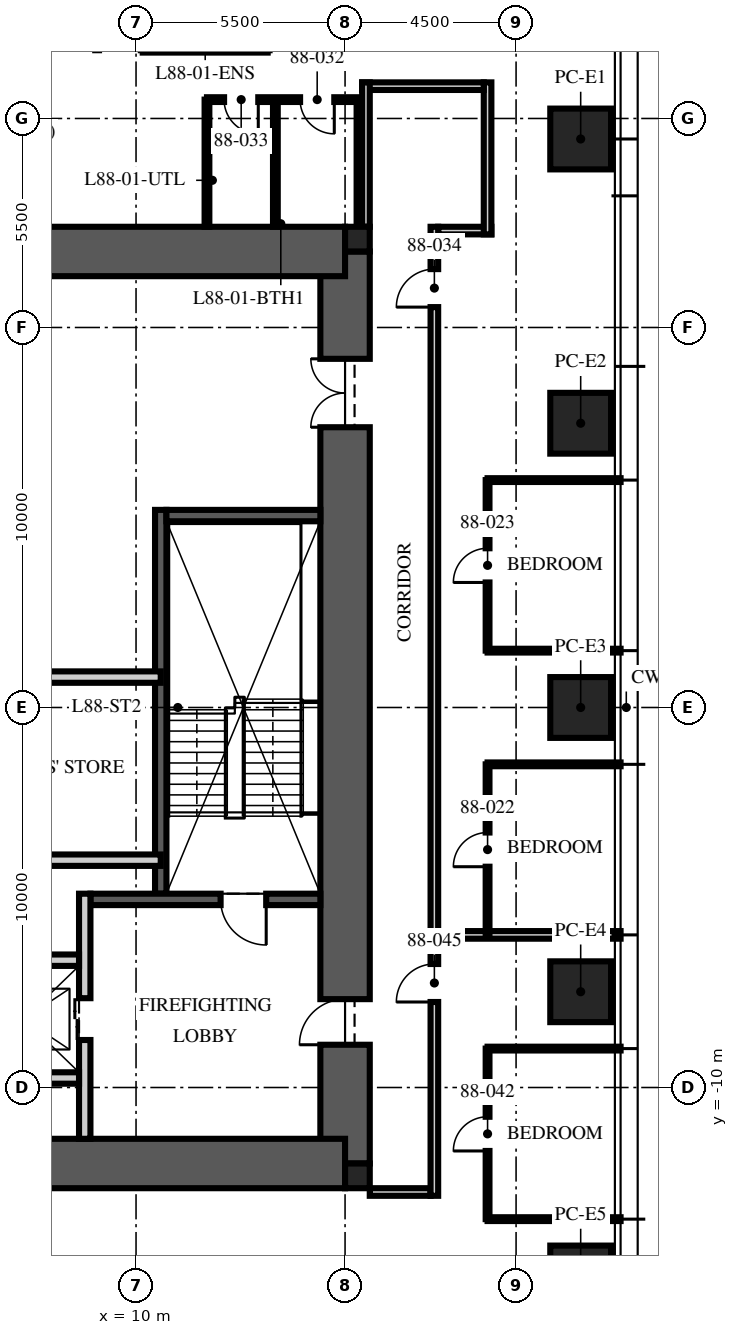
"""IFC4 building model, lengths in metres.
Left out: names, types, materials, properties, quantities, classifications, styles, units other than length and angle.
Written with IfcOpenShell. Run it as: python <this file> out.ifc"""

import sys

from ifc_helpers import new_model, si_unit, direction, frame, frame_2d, origin, origin_2d, place, context, subcontext, project, spatial, rectangle, extrude, element, fill, save


model = new_model("IFC4")
c1 = context("Model", 3, precision=1e-05, world=origin(), true_north=direction((0.0, 1.0)))
c2 = subcontext(c1, "Body", "Model", "MODEL_VIEW")
j1 = project(units=[si_unit("LENGTHUNIT", "METRE"), si_unit("PLANEANGLEUNIT", "RADIAN")], contexts=[c1])
p1 = place(None, origin())
s1 = spatial("IfcSite", under=j1, at=p1, CompositionType="ELEMENT")
p2 = place(p1, origin())
s2 = spatial("IfcBuilding", under=s1, at=p2, CompositionType="ELEMENT")
p3 = place(p2, frame((0.0, 0.0, 349.5)))
s3 = spatial("IfcBuildingStorey", under=s2, at=p3, CompositionType="ELEMENT", Elevation=349.5)
p4 = place(p3, frame((15.5, -12.0, -0.25), z_axis=(0.0, 0.0, 1.0), x_axis=(0.0, 1.0, 0.0)))
e1 = element("IfcWall", 1, at=p4, inside=s3, PredefinedType="SHEAR", context=c2, shape_type="SweptSolid", body=[
    extrude(rectangle(XDim=24.0, YDim=1.3, at=frame_2d((12.0, 0.0))), origin(), (0.0, 0.0, 1.0), 3.7),
])
p5 = place(p4, frame((3.125, 0.0, 0.25)))
e2 = element("IfcOpeningElement", 2, at=p5, cuts=e1, PredefinedType="OPENING", context=c2, shape_type="SweptSolid", body=[
    extrude(rectangle(XDim=1.2, YDim=2.1, at=frame_2d((0.6, 1.05))), frame((0.0, 0.66, 0.0), z_axis=(0.0, -1.0, 0.0), x_axis=(1.0, 0.0, 0.0)), (0.0, 0.0, 1.0), 1.32),
])
p6 = place(p4, frame((19.375, 0.0, 0.25)))
e3 = element("IfcOpeningElement", 3, at=p6, cuts=e1, PredefinedType="OPENING", context=c2, shape_type="SweptSolid", body=[
    extrude(rectangle(XDim=1.8, YDim=2.1, at=frame_2d((0.9, 1.05))), frame((0.0, 0.66, 0.0), z_axis=(0.0, -1.0, 0.0), x_axis=(1.0, 0.0, 0.0)), (0.0, 0.0, 1.0), 1.32),
])
for number, where, z_axis, x_axis in (
    (4, (-15.5, 12.0, -0.25), (0.0, 0.0, 1.0), (1.0, 0.0, 0.0)),
    (5, (-15.5, -12.0, -0.25), (0.0, 0.0, 1.0), (1.0, 0.0, 0.0)),
):
    element("IfcWall", number, at=place(p3, frame(where, z_axis=z_axis, x_axis=x_axis)), inside=s3, PredefinedType="SHEAR", context=c2, shape_type="SweptSolid", body=[
        extrude(rectangle(XDim=31.0, YDim=1.3, at=frame_2d((15.5, 0.0))), origin(), (0.0, 0.0, 1.0), 3.7),
    ])
for number, where, z_axis, x_axis in (
    (6, (15.825, 12.325, -0.25), (0.0, 0.0, 1.0), (1.0, 0.0, 0.0)),
    (7, (15.825, -12.325, -0.25), (0.0, 0.0, 1.0), (1.0, 0.0, 0.0)),
):
    element("IfcColumn", number, at=place(p3, frame(where, z_axis=z_axis, x_axis=x_axis)), inside=s3, PredefinedType="COLUMN", context=c2, shape_type="SweptSolid", body=[
        extrude(rectangle(XDim=0.65, YDim=0.65, at=origin_2d()), origin(), (0.0, 0.0, 1.0), 3.7),
    ])
for number, where, z_axis, x_axis in (
    (8, (21.7, 14.96, 0.0), (0.0, 0.0, 1.0), (0.0, 1.0, 0.0)),
    (9, (21.7, 7.48, 0.0), (0.0, 0.0, 1.0), (0.0, 1.0, 0.0)),
    (10, (21.7, 0.0, 0.0), (0.0, 0.0, 1.0), (0.0, 1.0, 0.0)),
    (11, (21.7, -7.48, 0.0), (0.0, 0.0, 1.0), (0.0, 1.0, 0.0)),
    (12, (21.7, -14.96, 0.0), (0.0, 0.0, 1.0), (0.0, 1.0, 0.0)),
):
    element("IfcColumn", number, at=place(p3, frame(where, z_axis=z_axis, x_axis=x_axis)), inside=s3, PredefinedType="COLUMN", context=c2, shape_type="SweptSolid", body=[
        extrude(rectangle(XDim=1.6, YDim=1.6, at=origin_2d()), origin(), (0.0, 0.0, 1.0), 3.75),
    ])
p7 = place(p3, frame((10.65, -4.9, 0.0), z_axis=(0.0, 0.0, 1.0), x_axis=(0.0, 1.0, 0.0)))
e13 = element("IfcWall", 13, at=p7, inside=s3, PredefinedType="SOLIDWALL", context=c2, shape_type="SweptSolid", body=[
    extrude(rectangle(XDim=10.1, YDim=0.3, at=frame_2d((5.05, 0.0))), origin(), (0.0, 0.0, 1.0), 3.45),
])
p8 = place(p3, frame((14.85, -5.05, 0.0), z_axis=(0.0, 0.0, 1.0), x_axis=(-1.0, 0.0, 0.0)))
e14 = element("IfcWall", 14, at=p8, inside=s3, PredefinedType="SOLIDWALL", context=c2, shape_type="SweptSolid", body=[
    extrude(rectangle(XDim=6.05, YDim=0.3, at=frame_2d((3.025, 0.0))), origin(), (0.0, 0.0, 1.0), 3.45),
])
p9 = place(p8, frame((1.425, 0.0, 0.0)))
e15 = element("IfcOpeningElement", 15, at=p9, cuts=e14, PredefinedType="OPENING", context=c2, shape_type="SweptSolid", body=[
    extrude(rectangle(XDim=1.2, YDim=2.1, at=frame_2d((0.6, 1.05))), frame((0.0, 0.16, 0.0), z_axis=(0.0, -1.0, 0.0), x_axis=(1.0, 0.0, 0.0)), (0.0, 0.0, 1.0), 0.32),
])
p10 = place(p3, frame((14.85, 5.05, 0.0), z_axis=(0.0, 0.0, 1.0), x_axis=(-1.0, 0.0, 0.0)))
e16 = element("IfcWall", 16, at=p10, inside=s3, PredefinedType="SOLIDWALL", context=c2, shape_type="SweptSolid", body=[
    extrude(rectangle(XDim=4.05, YDim=0.3, at=frame_2d((2.025, 0.0))), origin(), (0.0, 0.0, 1.0), 3.45),
])
p11 = place(p3, frame((8.65, -11.35, 0.0), z_axis=(0.0, 0.0, 1.0), x_axis=(0.0, 1.0, 0.0)))
e17 = element("IfcWall", 17, at=p11, inside=s3, PredefinedType="PARTITIONING", context=c2, shape_type="SweptSolid", body=[
    extrude(rectangle(XDim=6.45, YDim=0.3, at=frame_2d((3.225, 0.0))), origin(), (0.0, 0.0, 1.0), 3.45),
])
p12 = place(p11, frame((2.6, 0.0, 0.0)))
e18 = element("IfcOpeningElement", 18, at=p12, cuts=e17, PredefinedType="OPENING", context=c2, shape_type="SweptSolid", body=[
    extrude(rectangle(XDim=1.1, YDim=2.1, at=frame_2d((0.55, 1.05))), frame((0.0, 0.16, 0.0), z_axis=(0.0, -1.0, 0.0), x_axis=(1.0, 0.0, 0.0)), (0.0, 0.0, 1.0), 0.32),
])
p13 = place(p3, frame((-8.5, -6.65, 0.0), z_axis=(0.0, 0.0, 1.0), x_axis=(1.0, 0.0, 0.0)))
e19 = element("IfcWall", 19, at=p13, inside=s3, PredefinedType="PARTITIONING", context=c2, shape_type="SweptSolid", body=[
    extrude(rectangle(XDim=17.0, YDim=0.3, at=frame_2d((8.5, 0.0))), origin(), (0.0, 0.0, 1.0), 3.45),
])
p14 = place(p13, frame((7.8, 0.0, 0.0)))
e20 = element("IfcOpeningElement", 20, at=p14, cuts=e19, PredefinedType="OPENING", context=c2, shape_type="SweptSolid", body=[
    extrude(rectangle(XDim=1.3, YDim=2.4, at=frame_2d((0.65, 1.2))), frame((0.0, 0.16, 0.0), z_axis=(0.0, -1.0, 0.0), x_axis=(1.0, 0.0, 0.0)), (0.0, 0.0, 1.0), 0.32),
])
p15 = place(p13, frame((5.65, 0.0, 0.0)))
e21 = element("IfcOpeningElement", 21, at=p15, cuts=e19, PredefinedType="OPENING", context=c2, shape_type="SweptSolid", body=[
    extrude(rectangle(XDim=0.9, YDim=2.1, at=frame_2d((0.45, 1.05))), frame((0.0, 0.16, 0.0), z_axis=(0.0, -1.0, 0.0), x_axis=(1.0, 0.0, 0.0)), (0.0, 0.0, 1.0), 0.32),
])
p16 = place(p13, frame((10.4, 0.0, 0.0)))
e22 = element("IfcOpeningElement", 22, at=p16, cuts=e19, PredefinedType="OPENING", context=c2, shape_type="SweptSolid", body=[
    extrude(rectangle(XDim=0.9, YDim=2.1, at=frame_2d((0.45, 1.05))), frame((0.0, 0.16, 0.0), z_axis=(0.0, -1.0, 0.0), x_axis=(1.0, 0.0, 0.0)), (0.0, 0.0, 1.0), 0.32),
])
p17 = place(p3, frame((5.6, -9.75, 0.0), z_axis=(0.0, 0.0, 1.0), x_axis=(1.0, 0.0, 0.0)))
e23 = element("IfcWall", 23, at=p17, inside=s3, PredefinedType="PARTITIONING", context=c2, shape_type="SweptSolid", body=[
    extrude(rectangle(XDim=2.9, YDim=0.3, at=frame_2d((1.45, 0.0))), origin(), (0.0, 0.0, 1.0), 3.45),
])
p18 = place(p3, frame((-10.65, 0.8, 0.0), z_axis=(0.0, 0.0, 1.0), x_axis=(1.0, 0.0, 0.0)))
e24 = element("IfcWall", 24, at=p18, inside=s3, PredefinedType="PARTITIONING", context=c2, shape_type="SweptSolid", body=[
    extrude(rectangle(XDim=21.3, YDim=0.3, at=frame_2d((10.65, 0.0))), origin(), (0.0, 0.0, 1.0), 3.45),
])
p19 = place(p18, frame((10.05, 0.0, 0.0)))
e25 = element("IfcOpeningElement", 25, at=p19, cuts=e24, PredefinedType="OPENING", context=c2, shape_type="SweptSolid", body=[
    extrude(rectangle(XDim=1.2, YDim=2.1, at=frame_2d((0.6, 1.05))), frame((0.0, 0.16, 0.0), z_axis=(0.0, -1.0, 0.0), x_axis=(1.0, 0.0, 0.0)), (0.0, 0.0, 1.0), 0.32),
])
p20 = place(p18, frame((0.793, 0.0, 0.0)))
e26 = element("IfcOpeningElement", 26, at=p20, cuts=e24, PredefinedType="OPENING", context=c2, shape_type="SweptSolid", body=[
    extrude(rectangle(XDim=0.9, YDim=2.1, at=frame_2d((0.45, 1.05))), frame((0.0, 0.16, 0.0), z_axis=(0.0, -1.0, 0.0), x_axis=(1.0, 0.0, 0.0)), (0.0, 0.0, 1.0), 0.32),
])
p21 = place(p3, frame((10.65, -4.018, 0.0), z_axis=(0.0, 0.0, 1.0), x_axis=(-1.0, 0.0, 0.0)))
e27 = element("IfcWall", 27, at=p21, inside=s3, PredefinedType="PARTITIONING", context=c2, shape_type="SweptSolid", body=[
    extrude(rectangle(XDim=6.45, YDim=0.3, at=frame_2d((3.225, 0.0))), origin(), (0.0, 0.0, 1.0), 3.45),
])
p22 = place(p3, frame((17.95, 12.55, 0.0), z_axis=(0.0, 0.0, 1.0), x_axis=(1.0, 0.0, 0.0)))
e28 = element("IfcWall", 28, at=p22, inside=s3, PredefinedType="PARTITIONING", context=c2, shape_type="SweptSolid", body=[
    extrude(rectangle(XDim=1.4, YDim=0.2, at=frame_2d((0.7, 0.0))), origin(), (0.0, 0.0, 1.0), 3.45),
])
p23 = place(p3, frame((19.25, 12.45, 0.0), z_axis=(0.0, 0.0, 1.0), x_axis=(0.0, 1.0, 0.0)))
e29 = element("IfcWall", 29, at=p23, inside=s3, PredefinedType="PARTITIONING", context=c2, shape_type="SweptSolid", body=[
    extrude(rectangle(XDim=4.0, YDim=0.2, at=frame_2d((2.0, 0.0))), origin(), (0.0, 0.0, 1.0), 2.55),
])
p24 = place(p3, frame((19.15, 16.35, 0.0), z_axis=(0.0, 0.0, 1.0), x_axis=(-1.0, 0.0, 0.0)))
e30 = element("IfcWall", 30, at=p24, inside=s3, PredefinedType="PARTITIONING", context=c2, shape_type="SweptSolid", body=[
    extrude(rectangle(XDim=3.2, YDim=0.2, at=frame_2d((1.6, 0.0))), origin(), (0.0, 0.0, 1.0), 2.45),
])
p25 = place(p3, frame((16.05, 16.45, 0.0), z_axis=(0.0, 0.0, 1.0), x_axis=(0.0, -1.0, 0.0)))
e31 = element("IfcWall", 31, at=p25, inside=s3, PredefinedType="PARTITIONING", context=c2, shape_type="SweptSolid", body=[
    extrude(rectangle(XDim=3.8, YDim=0.2, at=frame_2d((1.9, 0.0))), origin(), (0.0, 0.0, 1.0), 2.45),
])
p26 = place(p3, frame((16.15, -12.75, 0.0), z_axis=(0.0, 0.0, 1.0), x_axis=(1.0, 0.0, 0.0)))
e32 = element("IfcWall", 32, at=p26, inside=s3, PredefinedType="PARTITIONING", context=c2, shape_type="SweptSolid", body=[
    extrude(rectangle(XDim=1.6, YDim=0.2, at=frame_2d((0.8, 0.0))), origin(), (0.0, 0.0, 1.0), 2.45),
])
p27 = place(p3, frame((17.95, -5.984, 0.0), z_axis=(0.0, 0.0, 1.0), x_axis=(1.0, 0.0, 0.0)))
e33 = element("IfcWall", 33, at=p27, inside=s3, PredefinedType="PARTITIONING", context=c2, shape_type="SweptSolid", body=[
    extrude(rectangle(XDim=4.8, YDim=0.2, at=frame_2d((2.4, 0.0))), origin(), (0.0, 0.0, 1.0), 2.85),
])
for number, where, z_axis, x_axis in (
    (34, (19.25, -1.496, 0.0), (0.0, 0.0, 1.0), (1.0, 0.0, 0.0)),
    (35, (19.25, 1.496, 0.0), (0.0, 0.0, 1.0), (1.0, 0.0, 0.0)),
    (36, (19.25, 5.984, 0.0), (0.0, 0.0, 1.0), (1.0, 0.0, 0.0)),
    (37, (19.25, -13.464, 0.0), (0.0, 0.0, 1.0), (1.0, 0.0, 0.0)),
    (38, (19.25, -8.976, 0.0), (0.0, 0.0, 1.0), (1.0, 0.0, 0.0)),
):
    element("IfcWall", number, at=place(p3, frame(where, z_axis=z_axis, x_axis=x_axis)), inside=s3, PredefinedType="PARTITIONING", context=c2, shape_type="SweptSolid", body=[
        extrude(rectangle(XDim=3.5, YDim=0.1, at=frame_2d((1.75, 0.0))), origin(), (0.0, 0.0, 1.0), 2.85),
    ])
p28 = place(p3, frame((19.25, -5.984, 0.0), z_axis=(0.0, 0.0, 1.0), x_axis=(0.0, 1.0, 0.0)))
e39 = element("IfcWall", 39, at=p28, inside=s3, PredefinedType="PARTITIONING", context=c2, shape_type="SweptSolid", body=[
    extrude(rectangle(XDim=4.488, YDim=0.1, at=frame_2d((2.244, 0.0))), origin(), (0.0, 0.0, 1.0), 2.56),
])
p29 = place(p28, frame((1.794, 0.0, 0.0)))
e40 = element("IfcOpeningElement", 40, at=p29, cuts=e39, PredefinedType="OPENING", context=c2, shape_type="SweptSolid", body=[
    extrude(rectangle(XDim=0.9, YDim=2.1, at=frame_2d((0.45, 1.05))), frame((0.0, 0.06, 0.0), z_axis=(0.0, -1.0, 0.0), x_axis=(1.0, 0.0, 0.0)), (0.0, 0.0, 1.0), 0.12),
])
p30 = place(p3, frame((19.25, 1.496, 0.0), z_axis=(0.0, 0.0, 1.0), x_axis=(0.0, 1.0, 0.0)))
e41 = element("IfcWall", 41, at=p30, inside=s3, PredefinedType="PARTITIONING", context=c2, shape_type="SweptSolid", body=[
    extrude(rectangle(XDim=4.488, YDim=0.1, at=frame_2d((2.244, 0.0))), origin(), (0.0, 0.0, 1.0), 2.56),
])
p31 = place(p30, frame((1.794, 0.0, 0.0)))
e42 = element("IfcOpeningElement", 42, at=p31, cuts=e41, PredefinedType="OPENING", context=c2, shape_type="SweptSolid", body=[
    extrude(rectangle(XDim=0.9, YDim=2.1, at=frame_2d((0.45, 1.05))), frame((0.0, 0.06, 0.0), z_axis=(0.0, -1.0, 0.0), x_axis=(1.0, 0.0, 0.0)), (0.0, 0.0, 1.0), 0.12),
])
p32 = place(p3, frame((13.464, 17.296, 0.0), z_axis=(0.0, 0.0, 1.0), x_axis=(-1.0, 0.0, 0.0)))
e43 = element("IfcWall", 43, at=p32, inside=s3, PredefinedType="PARTITIONING", context=c2, shape_type="SweptSolid", body=[
    extrude(rectangle(XDim=3.288, YDim=0.125, at=frame_2d((1.644, 0.0))), origin(), (0.0, 0.0, 1.0), 2.56),
])
p33 = place(p3, frame((15.866, 15.996, 0.0), z_axis=(0.0, 0.0, 1.0), x_axis=(-1.0, 0.0, 0.0)))
e44 = element("IfcWall", 44, at=p33, inside=s3, PredefinedType="PARTITIONING", context=c2, shape_type="SweptSolid", body=[
    extrude(rectangle(XDim=4.0, YDim=0.125, at=frame_2d((2.0, 0.0))), origin(), (0.0, 0.0, 1.0), 2.45),
])
p34 = place(p33, frame((0.65, 0.0, 0.0)))
e45 = element("IfcOpeningElement", 45, at=p34, cuts=e44, PredefinedType="OPENING", context=c2, shape_type="SweptSolid", body=[
    extrude(rectangle(XDim=0.9, YDim=2.1, at=frame_2d((0.45, 1.05))), frame((0.0, 0.073, 0.0), z_axis=(0.0, -1.0, 0.0), x_axis=(1.0, 0.0, 0.0)), (0.0, 0.0, 1.0), 0.145),
])
p35 = place(p33, frame((2.65, 0.0, 0.0)))
e46 = element("IfcOpeningElement", 46, at=p35, cuts=e44, PredefinedType="OPENING", context=c2, shape_type="SweptSolid", body=[
    extrude(rectangle(XDim=0.9, YDim=2.1, at=frame_2d((0.45, 1.05))), frame((0.0, 0.073, 0.0), z_axis=(0.0, -1.0, 0.0), x_axis=(1.0, 0.0, 0.0)), (0.0, 0.0, 1.0), 0.145),
])
p36 = place(p3, frame((15.866, 12.65, 0.0), z_axis=(0.0, 0.0, 1.0), x_axis=(0.0, 1.0, 0.0)))
e47 = element("IfcWall", 47, at=p36, inside=s3, PredefinedType="PARTITIONING", context=c2, shape_type="SweptSolid", body=[
    extrude(rectangle(XDim=3.346, YDim=0.125, at=frame_2d((1.673, 0.0))), origin(), (0.0, 0.0, 1.0), 2.45),
])
for number, where, z_axis, x_axis in (
    (48, (13.667, 12.65, 0.0), (0.0, 0.0, 1.0), (0.0, 1.0, 0.0)),
    (49, (11.866, 12.65, 0.0), (0.0, 0.0, 1.0), (0.0, 1.0, 0.0)),
):
    element("IfcWall", number, at=place(p3, frame(where, z_axis=z_axis, x_axis=x_axis)), inside=s3, PredefinedType="PARTITIONING", context=c2, shape_type="SweptSolid", body=[
        extrude(rectangle(XDim=3.346, YDim=0.125, at=frame_2d((1.673, 0.0))), origin(), (0.0, 0.0, 1.0), 3.45),
    ])
p37 = place(p3, frame((19.25, -13.464, 0.0), z_axis=(0.0, 0.0, 1.0), x_axis=(0.0, 1.0, 0.0)))
e50 = element("IfcWall", 50, at=p37, inside=s3, PredefinedType="PARTITIONING", context=c2, shape_type="SweptSolid", body=[
    extrude(rectangle(XDim=4.488, YDim=0.1, at=frame_2d((2.244, 0.0))), origin(), (0.0, 0.0, 1.0), 2.56),
])
p38 = place(p37, frame((1.794, 0.0, 0.0)))
e51 = element("IfcOpeningElement", 51, at=p38, cuts=e50, PredefinedType="OPENING", context=c2, shape_type="SweptSolid", body=[
    extrude(rectangle(XDim=0.9, YDim=2.1, at=frame_2d((0.45, 1.05))), frame((0.0, 0.06, 0.0), z_axis=(0.0, -1.0, 0.0), x_axis=(1.0, 0.0, 0.0)), (0.0, 0.0, 1.0), 0.12),
])
p39 = place(p3, frame((17.85, -12.85, 0.0), z_axis=(0.0, 0.0, 1.0), x_axis=(0.0, 1.0, 0.0)))
e52 = element("IfcWall", 52, at=p39, inside=s3, PredefinedType="PARTITIONING", context=c2, shape_type="SweptSolid", body=[
    extrude(rectangle(XDim=25.5, YDim=0.2, at=frame_2d((12.75, 0.0))), origin(), (0.0, 0.0, 1.0), 2.45),
])
p40 = place(p39, frame((23.386, 0.0, 0.0)))
e53 = element("IfcOpeningElement", 53, at=p40, cuts=e52, PredefinedType="OPENING", context=c2, shape_type="SweptSolid", body=[
    extrude(rectangle(XDim=1.0, YDim=2.2, at=frame_2d((0.5, 1.1))), frame((0.0, 0.11, 0.0), z_axis=(0.0, -1.0, 0.0), x_axis=(1.0, 0.0, 0.0)), (0.0, 0.0, 1.0), 0.22),
])
p41 = place(p39, frame((5.1, 0.0, 0.0)))
e54 = element("IfcOpeningElement", 54, at=p41, cuts=e52, PredefinedType="OPENING", context=c2, shape_type="SweptSolid", body=[
    extrude(rectangle(XDim=1.0, YDim=2.2, at=frame_2d((0.5, 1.1))), frame((0.0, 0.11, 0.0), z_axis=(0.0, -1.0, 0.0), x_axis=(1.0, 0.0, 0.0)), (0.0, 0.0, 1.0), 0.22),
])
p42 = place(p9, origin())
e55 = element("IfcDoor", 55, at=p42, inside=s3, OperationType="SINGLE_SWING_LEFT", PredefinedType="DOOR", context=c2, shape_type="SweptSolid", body=[
    extrude(rectangle(XDim=1.2, YDim=2.1, at=frame_2d((0.6, 1.05))), frame((0.0, 0.025, 0.0), z_axis=(0.0, -1.0, 0.0), x_axis=(1.0, 0.0, 0.0)), (0.0, 0.0, 1.0), 0.05),
])
fill(e15, e55)
p43 = place(p5, origin())
e56 = element("IfcDoor", 56, at=p43, inside=s3, OperationType="SINGLE_SWING_LEFT", PredefinedType="DOOR", context=c2, shape_type="SweptSolid", body=[
    extrude(rectangle(XDim=1.2, YDim=2.1, at=frame_2d((0.6, 1.05))), frame((0.0, 0.025, 0.0), z_axis=(0.0, -1.0, 0.0), x_axis=(1.0, 0.0, 0.0)), (0.0, 0.0, 1.0), 0.05),
])
fill(e2, e56)
p44 = place(p6, origin())
e57 = element("IfcDoor", 57, at=p44, inside=s3, OperationType="DOUBLE_DOOR_SINGLE_SWING", PredefinedType="DOOR", context=c2, shape_type="SweptSolid", body=[
    extrude(rectangle(XDim=1.8, YDim=2.1, at=frame_2d((0.9, 1.05))), frame((0.0, 0.025, 0.0), z_axis=(0.0, -1.0, 0.0), x_axis=(1.0, 0.0, 0.0)), (0.0, 0.0, 1.0), 0.05),
])
fill(e3, e57)
p45 = place(p12, origin())
e58 = element("IfcDoor", 58, at=p45, inside=s3, OperationType="DOUBLE_DOOR_SLIDING", PredefinedType="DOOR", context=c2, shape_type="SweptSolid", body=[
    extrude(rectangle(XDim=1.1, YDim=2.1, at=frame_2d((0.55, 1.05))), frame((0.0, 0.025, 0.0), z_axis=(0.0, -1.0, 0.0), x_axis=(1.0, 0.0, 0.0)), (0.0, 0.0, 1.0), 0.05),
])
fill(e18, e58)
p46 = place(p29, origin())
e59 = element("IfcDoor", 59, at=p46, inside=s3, OperationType="SINGLE_SWING_LEFT", PredefinedType="DOOR", context=c2, shape_type="SweptSolid", body=[
    extrude(rectangle(XDim=0.9, YDim=2.1, at=frame_2d((0.45, 1.05))), frame((0.0, 0.025, 0.0), z_axis=(0.0, -1.0, 0.0), x_axis=(1.0, 0.0, 0.0)), (0.0, 0.0, 1.0), 0.05),
])
fill(e40, e59)
p47 = place(p31, origin())
e60 = element("IfcDoor", 60, at=p47, inside=s3, OperationType="SINGLE_SWING_LEFT", PredefinedType="DOOR", context=c2, shape_type="SweptSolid", body=[
    extrude(rectangle(XDim=0.9, YDim=2.1, at=frame_2d((0.45, 1.05))), frame((0.0, 0.025, 0.0), z_axis=(0.0, -1.0, 0.0), x_axis=(1.0, 0.0, 0.0)), (0.0, 0.0, 1.0), 0.05),
])
fill(e42, e60)
p48 = place(p34, origin())
e61 = element("IfcDoor", 61, at=p48, inside=s3, OperationType="SINGLE_SWING_LEFT", PredefinedType="DOOR", context=c2, shape_type="SweptSolid", body=[
    extrude(rectangle(XDim=0.9, YDim=2.1, at=frame_2d((0.45, 1.05))), frame((0.0, 0.025, 0.0), z_axis=(0.0, -1.0, 0.0), x_axis=(1.0, 0.0, 0.0)), (0.0, 0.0, 1.0), 0.05),
])
fill(e45, e61)
p49 = place(p35, origin())
e62 = element("IfcDoor", 62, at=p49, inside=s3, OperationType="SINGLE_SWING_LEFT", PredefinedType="DOOR", context=c2, shape_type="SweptSolid", body=[
    extrude(rectangle(XDim=0.9, YDim=2.1, at=frame_2d((0.45, 1.05))), frame((0.0, 0.025, 0.0), z_axis=(0.0, -1.0, 0.0), x_axis=(1.0, 0.0, 0.0)), (0.0, 0.0, 1.0), 0.05),
])
fill(e46, e62)
p50 = place(p40, origin())
e63 = element("IfcDoor", 63, at=p50, inside=s3, OperationType="SINGLE_SWING_LEFT", PredefinedType="DOOR", context=c2, shape_type="SweptSolid", body=[
    extrude(rectangle(XDim=1.0, YDim=2.2, at=frame_2d((0.5, 1.1))), frame((0.0, 0.025, 0.0), z_axis=(0.0, -1.0, 0.0), x_axis=(1.0, 0.0, 0.0)), (0.0, 0.0, 1.0), 0.05),
])
fill(e53, e63)
p51 = place(p38, origin())
e64 = element("IfcDoor", 64, at=p51, inside=s3, OperationType="SINGLE_SWING_LEFT", PredefinedType="DOOR", context=c2, shape_type="SweptSolid", body=[
    extrude(rectangle(XDim=0.9, YDim=2.1, at=frame_2d((0.45, 1.05))), frame((0.0, 0.025, 0.0), z_axis=(0.0, -1.0, 0.0), x_axis=(1.0, 0.0, 0.0)), (0.0, 0.0, 1.0), 0.05),
])
fill(e51, e64)
p52 = place(p41, origin())
e65 = element("IfcDoor", 65, at=p52, inside=s3, OperationType="SINGLE_SWING_LEFT", PredefinedType="DOOR", context=c2, shape_type="SweptSolid", body=[
    extrude(rectangle(XDim=1.0, YDim=2.2, at=frame_2d((0.5, 1.1))), frame((0.0, 0.025, 0.0), z_axis=(0.0, -1.0, 0.0), x_axis=(1.0, 0.0, 0.0)), (0.0, 0.0, 1.0), 0.05),
])
fill(e54, e65)
save(model, sys.argv[1])
